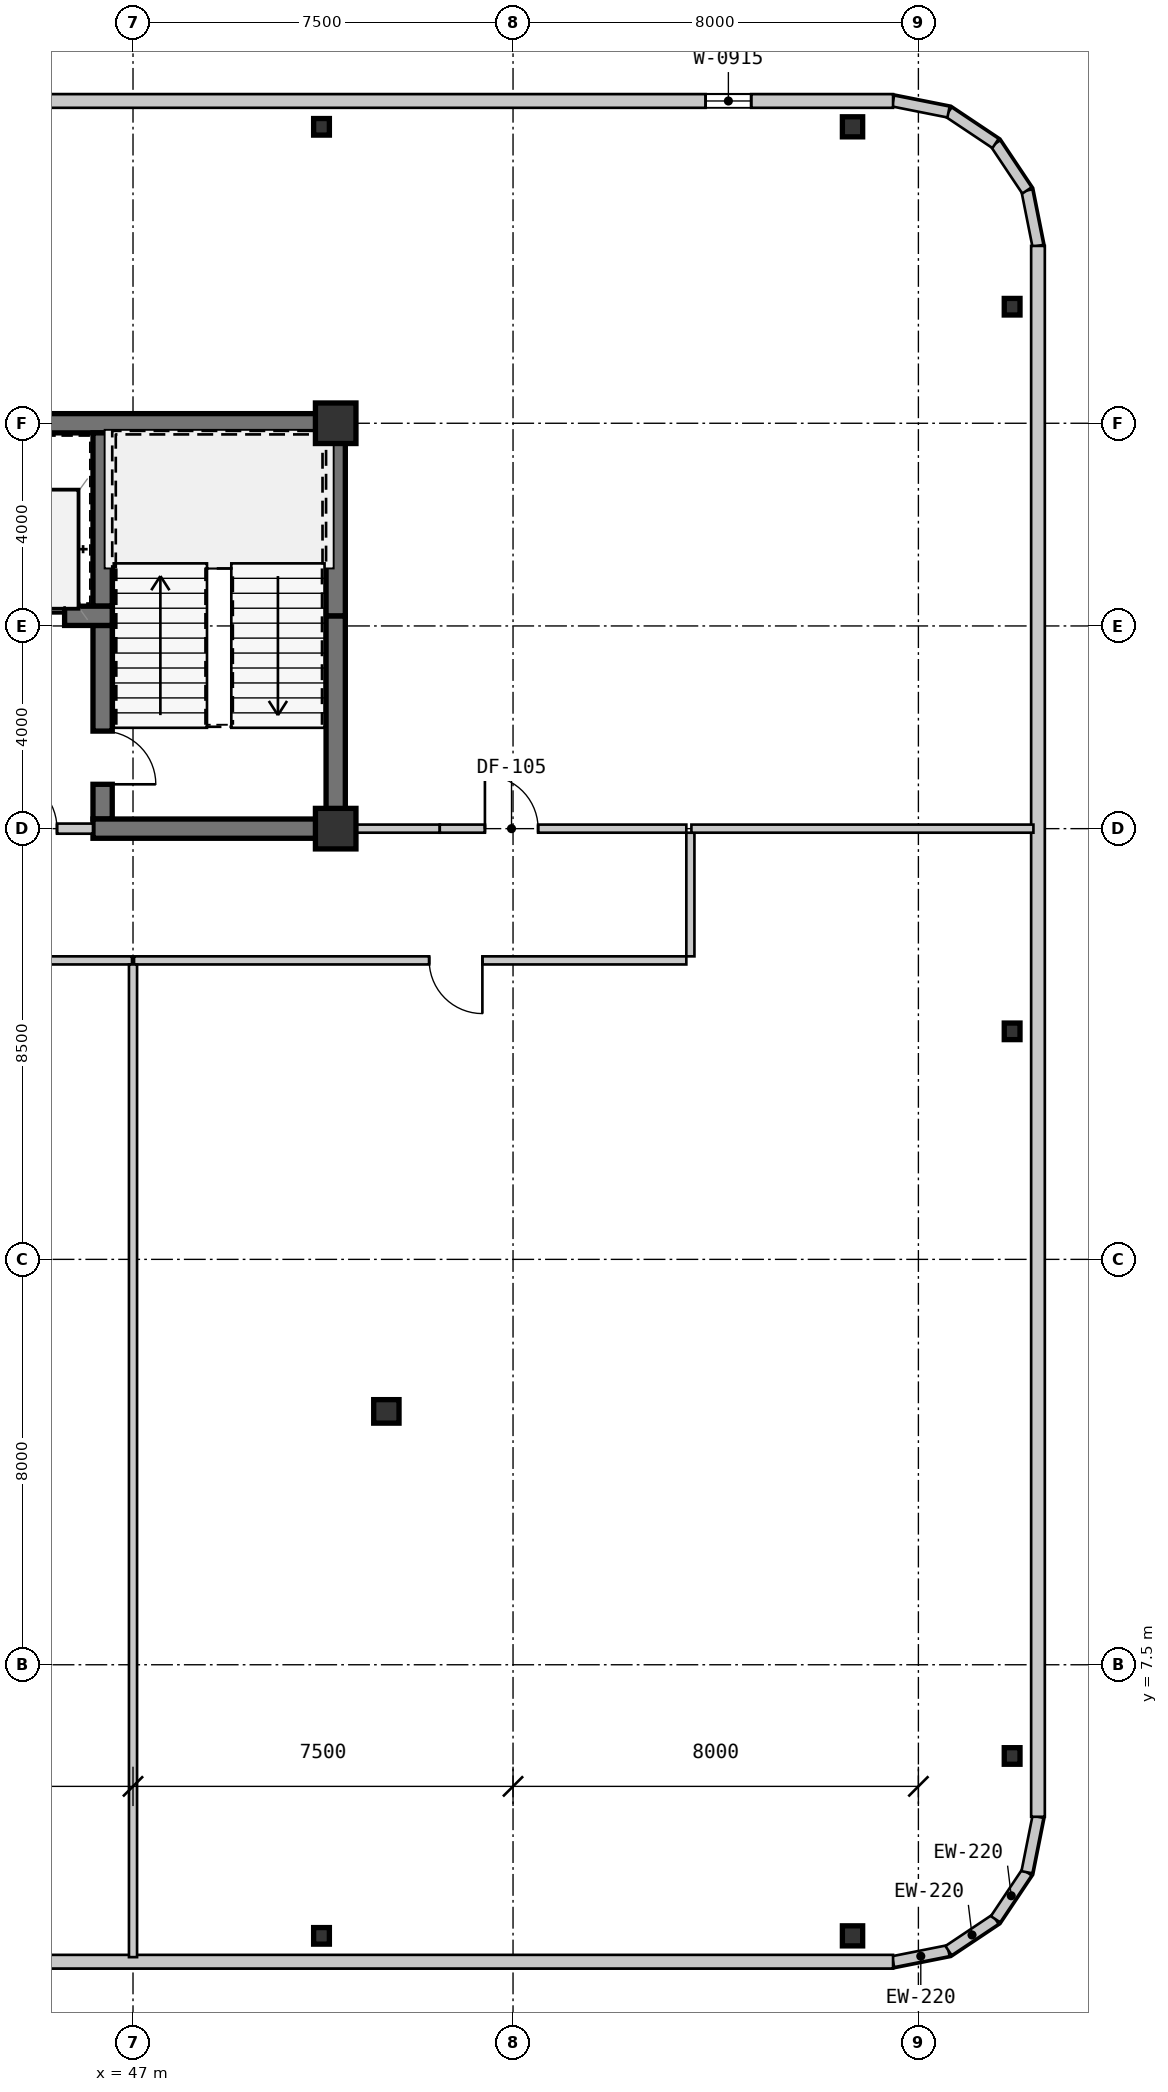
"""IFC4 building model, lengths in metres.
Left out: names, types, materials, properties, quantities, classifications, styles, units other than length and angle.
Written with IfcOpenShell. Run it as: python <this file> out.ifc"""

import sys

from ifc_helpers import new_model, si_unit, direction, frame, frame_2d, origin, origin_2d, place, context, subcontext, project, spatial, rectangle, i_section, extrude, source, transform, mapped, element, fill, save


model = new_model("IFC4")
c1 = context("Model", 3, precision=1e-05, world=origin(), true_north=direction((0.0, 1.0)))
c2 = subcontext(c1, "Body", "Model", "MODEL_VIEW")
j1 = project(units=[si_unit("LENGTHUNIT", "METRE"), si_unit("PLANEANGLEUNIT", "RADIAN")], contexts=[c1])
p1 = place(None, origin())
s1 = spatial("IfcSite", under=j1, at=p1, CompositionType="ELEMENT")
p2 = place(p1, origin())
s2 = spatial("IfcBuilding", under=s1, at=p2, CompositionType="ELEMENT")
p3 = place(p2, frame((0.0, 0.0, 60.9)))
s3 = spatial("IfcBuildingStorey", under=s2, at=p3, CompositionType="ELEMENT", Elevation=60.9)
m1 = source(origin(), c2, "Body", "SweptSolid", [
    extrude(rectangle(XDim=0.8, YDim=0.8, at=origin_2d()), origin(), (0.0, 0.0, 1.0), 4.2),
])
for number, where, z_axis, x_axis in (
    (1, (51.0, 24.0, 0.0), (0.0, 0.0, 1.0), (1.0, 0.0, 0.0)),
    (2, (51.0, 32.0, 0.0), (0.0, 0.0, 1.0), (1.0, 0.0, 0.0)),
):
    element("IfcColumn", number, at=place(p3, frame(where, z_axis=z_axis, x_axis=x_axis)), inside=s3, PredefinedType="COLUMN", context=c2, shape_type="MappedRepresentation", body=[
        mapped(m1, transform((0.0, 0.0, 0.0), scale=1.0)),
    ])
m2 = source(origin(), c2, "Body", "SweptSolid", [
    extrude(i_section(OverallWidth=0.5, OverallDepth=0.464, WebThickness=0.022, FlangeThickness=0.034, at=origin_2d()), origin(), (0.0, 0.0, 1.0), 4.2),
])
p4 = place(p3, frame((52.0, 12.5, 0.0), z_axis=(0.0, 0.0, 1.0), x_axis=(1.0, 0.0, 0.0)))
e3 = element("IfcColumn", 3, at=p4, inside=s3, PredefinedType="COLUMN", context=c2, shape_type="MappedRepresentation", body=[
    mapped(m2, transform((0.0, 0.0, 0.0), scale=1.0)),
])
m3 = source(origin(), c2, "Body", "SweptSolid", [
    extrude(i_section(OverallWidth=0.311, OverallDepth=0.327, WebThickness=0.016, FlangeThickness=0.025, at=origin_2d()), origin(), (0.0, 0.0, 1.0), 4.2),
])
p5 = place(p3, frame((50.72, 2.15, 0.0), z_axis=(0.0, 0.0, 1.0), x_axis=(1.0, 0.0, 0.0)))
e4 = element("IfcColumn", 4, at=p5, inside=s3, PredefinedType="COLUMN", context=c2, shape_type="MappedRepresentation", body=[
    mapped(m3, transform((0.0, 0.0, 0.0), scale=1.0)),
])
m4 = source(origin(), c2, "Body", "SweptSolid", [
    extrude(i_section(OverallWidth=0.4, OverallDepth=0.396, WebThickness=0.022, FlangeThickness=0.034, at=origin_2d()), origin(), (0.0, 0.0, 1.0), 4.2),
])
p6 = place(p3, frame((61.2, 2.15, 0.0), z_axis=(0.0, 0.0, 1.0), x_axis=(1.0, 0.0, 0.0)))
e5 = element("IfcColumn", 5, at=p6, inside=s3, PredefinedType="COLUMN", context=c2, shape_type="MappedRepresentation", body=[
    mapped(m4, transform((0.0, 0.0, 0.0), scale=1.0)),
])
p7 = place(p3, frame((50.72, 37.85, 0.0), z_axis=(0.0, 0.0, 1.0), x_axis=(1.0, 0.0, 0.0)))
e6 = element("IfcColumn", 6, at=p7, inside=s3, PredefinedType="COLUMN", context=c2, shape_type="MappedRepresentation", body=[
    mapped(m3, transform((0.0, 0.0, 0.0), scale=1.0)),
])
p8 = place(p3, frame((61.2, 37.85, 0.0), z_axis=(0.0, 0.0, 1.0), x_axis=(1.0, 0.0, 0.0)))
e7 = element("IfcColumn", 7, at=p8, inside=s3, PredefinedType="COLUMN", context=c2, shape_type="MappedRepresentation", body=[
    mapped(m4, transform((0.0, 0.0, 0.0), scale=1.0)),
])
for number, where, z_axis, x_axis in (
    (8, (64.35, 5.7, 0.0), (0.0, 0.0, 1.0), (1.0, 0.0, 0.0)),
    (9, (64.35, 20.0, 0.0), (0.0, 0.0, 1.0), (1.0, 0.0, 0.0)),
    (10, (64.35, 34.3, 0.0), (0.0, 0.0, 1.0), (1.0, 0.0, 0.0)),
):
    element("IfcColumn", number, at=place(p3, frame(where, z_axis=z_axis, x_axis=x_axis)), inside=s3, PredefinedType="COLUMN", context=c2, shape_type="MappedRepresentation", body=[
        mapped(m3, transform((0.0, 0.0, 0.0), scale=1.0)),
    ])
m5 = source(origin(), c2, "Body", "SweptSolid", [
    extrude(rectangle(XDim=1.116, YDim=0.22, at=frame_2d((0.558, 0.0))), origin(), (0.0, 0.0, 1.0), 3.78),
])
for number, where, z_axis, x_axis in (
    (11, (62.0, 1.64, 0.0), (0.0, 0.0, 1.0), (0.981, 0.195, 0.0)),
    (12, (63.094, 1.858, 0.0), (0.0, 0.0, 1.0), (0.831, 0.556, 0.0)),
    (13, (64.022, 2.478, 0.0), (0.0, 0.0, 1.0), (0.556, 0.831, 0.0)),
    (14, (64.642, 3.406, 0.0), (0.0, 0.0, 1.0), (0.195, 0.981, 0.0)),
    (15, (64.86, 35.5, 0.0), (0.0, 0.0, 1.0), (-0.195, 0.981, 0.0)),
    (16, (64.642, 36.594, 0.0), (0.0, 0.0, 1.0), (-0.556, 0.831, 0.0)),
    (17, (64.022, 37.522, 0.0), (0.0, 0.0, 1.0), (-0.831, 0.556, 0.0)),
    (18, (63.094, 38.142, 0.0), (0.0, 0.0, 1.0), (-0.981, 0.195, 0.0)),
):
    element("IfcWall", number, at=place(p3, frame(where, z_axis=z_axis, x_axis=x_axis)), inside=s3, PredefinedType="SOLIDWALL", context=c2, shape_type="MappedRepresentation", body=[
        mapped(m5, transform((0.0, 0.0, 0.0), scale=1.0)),
    ])
m6 = source(origin(), c2, "Body", "SweptSolid", [
    extrude(rectangle(XDim=32.714, YDim=0.27, at=frame_2d((16.357, 0.0))), origin(), (0.0, 0.0, 1.0), 3.78),
])
p9 = place(p3, frame((29.286, 1.64, 0.0), z_axis=(0.0, 0.0, 1.0), x_axis=(1.0, 0.0, 0.0)))
e19 = element("IfcWall", 19, at=p9, inside=s3, PredefinedType="SOLIDWALL", context=c2, shape_type="MappedRepresentation", body=[
    mapped(m6, transform((0.0, 0.0, 0.0), scale=1.0)),
])
m7 = source(origin(), c2, "Body", "SweptSolid", [
    extrude(rectangle(XDim=54.0, YDim=0.27, at=frame_2d((27.0, 0.0))), origin(), (0.0, 0.0, 1.0), 3.78),
])
p10 = place(p3, frame((62.0, 38.36, 0.0), z_axis=(0.0, 0.0, 1.0), x_axis=(-1.0, 0.0, 0.0)))
e20 = element("IfcWall", 20, at=p10, inside=s3, PredefinedType="SOLIDWALL", context=c2, shape_type="MappedRepresentation", body=[
    mapped(m7, transform((0.0, 0.0, 0.0), scale=1.0)),
])
m8 = source(origin(), c2, "Body", "SweptSolid", [
    extrude(rectangle(XDim=0.9, YDim=1.5, at=frame_2d((0.45, 0.75))), frame((0.0, 0.145, 0.0), z_axis=(0.0, -1.0, 0.0), x_axis=(1.0, 0.0, 0.0)), (0.0, 0.0, 1.0), 0.29),
])
p11 = place(p10, frame((2.8, 0.0, 0.7)))
e21 = element("IfcOpeningElement", 21, at=p11, cuts=e20, PredefinedType="OPENING", context=c2, shape_type="MappedRepresentation", body=[
    mapped(m8, transform((0.0, 0.0, 0.0), scale=1.0)),
])
p12 = place(p10, frame((50.3, 0.0, 1.5)))
e22 = element("IfcOpeningElement", 22, at=p12, cuts=e20, PredefinedType="OPENING", context=c2, shape_type="MappedRepresentation", body=[
    mapped(m8, transform((0.0, 0.0, 0.0), scale=1.0)),
])
m9 = source(origin(), c2, "Body", "SweptSolid", [
    extrude(rectangle(XDim=31.0, YDim=0.27, at=frame_2d((15.5, 0.0))), origin(), (0.0, 0.0, 1.0), 3.78),
])
p13 = place(p3, frame((64.86, 4.5, 0.0), z_axis=(0.0, 0.0, 1.0), x_axis=(0.0, 1.0, 0.0)))
e23 = element("IfcWall", 23, at=p13, inside=s3, PredefinedType="SOLIDWALL", context=c2, shape_type="MappedRepresentation", body=[
    mapped(m9, transform((0.0, 0.0, 0.0), scale=1.0)),
])
m10 = source(origin(), c2, "Body", "SweptSolid", [
    extrude(rectangle(XDim=11.99, YDim=0.38, at=frame_2d((5.995, 0.0))), origin(), (0.0, 0.0, 1.0), 3.78),
])
p14 = place(p3, frame((39.2, 32.0, 0.0), z_axis=(0.0, 0.0, 1.0), x_axis=(1.0, 0.0, 0.0)))
e24 = element("IfcWall", 24, at=p14, inside=s3, PredefinedType="SHEAR", context=c2, shape_type="MappedRepresentation", body=[
    mapped(m10, transform((0.0, 0.0, 0.0), scale=1.0)),
])
m11 = source(origin(), c2, "Body", "SweptSolid", [
    extrude(rectangle(XDim=4.01, YDim=0.38, at=frame_2d((2.005, 0.0))), origin(), (0.0, 0.0, 1.0), 3.78),
])
p15 = place(p3, frame((51.0, 24.19, 0.0), z_axis=(0.0, 0.0, 1.0), x_axis=(0.0, 1.0, 0.0)))
e25 = element("IfcWall", 25, at=p15, inside=s3, PredefinedType="SHEAR", context=c2, shape_type="MappedRepresentation", body=[
    mapped(m11, transform((0.0, 0.0, 0.0), scale=1.0)),
])
m12 = source(origin(), c2, "Body", "SweptSolid", [
    extrude(rectangle(XDim=3.61, YDim=0.38, at=frame_2d((1.805, 0.0))), origin(), (0.0, 0.0, 1.0), 3.78),
])
p16 = place(p3, frame((51.0, 28.2, 0.0), z_axis=(0.0, 0.0, 1.0), x_axis=(0.0, 1.0, 0.0)))
e26 = element("IfcWall", 26, at=p16, inside=s3, PredefinedType="SHEAR", context=c2, shape_type="MappedRepresentation", body=[
    mapped(m12, transform((0.0, 0.0, 0.0), scale=1.0)),
])
m13 = source(origin(), c2, "Body", "SweptSolid", [
    extrude(rectangle(XDim=3.42, YDim=0.38, at=frame_2d((1.71, 0.0))), origin(), (0.0, 0.0, 1.0), 3.78),
])
p17 = place(p3, frame((46.4, 31.81, 0.0), z_axis=(0.0, 0.0, 1.0), x_axis=(0.0, -1.0, 0.0)))
e27 = element("IfcWall", 27, at=p17, inside=s3, PredefinedType="SHEAR", context=c2, shape_type="MappedRepresentation", body=[
    mapped(m13, transform((0.0, 0.0, 0.0), scale=1.0)),
])
m14 = source(origin(), c2, "Body", "SweptSolid", [
    extrude(rectangle(XDim=3.82, YDim=0.38, at=frame_2d((1.91, 0.0))), origin(), (0.0, 0.0, 1.0), 3.78),
])
p18 = place(p3, frame((46.4, 28.01, 0.0), z_axis=(0.0, 0.0, 1.0), x_axis=(0.0, -1.0, 0.0)))
e28 = element("IfcWall", 28, at=p18, inside=s3, PredefinedType="SHEAR", context=c2, shape_type="MappedRepresentation", body=[
    mapped(m14, transform((0.0, 0.0, 0.0), scale=1.0)),
])
m15 = source(origin(), c2, "Body", "SweptSolid", [
    extrude(rectangle(XDim=1.05, YDim=2.1, at=frame_2d((0.525, 1.05))), frame((0.0, 0.2, 0.0), z_axis=(0.0, -1.0, 0.0), x_axis=(1.0, 0.0, 0.0)), (0.0, 0.0, 1.0), 0.4),
])
p19 = place(p18, frame((2.085, 0.0, 0.0)))
e29 = element("IfcOpeningElement", 29, at=p19, cuts=e28, PredefinedType="OPENING", context=c2, shape_type="MappedRepresentation", body=[
    mapped(m15, transform((0.0, 0.0, 0.0), scale=1.0)),
])
m16 = source(origin(), c2, "Body", "SweptSolid", [
    extrude(rectangle(XDim=4.98, YDim=0.38, at=frame_2d((2.49, 0.0))), origin(), (0.0, 0.0, 1.0), 3.78),
])
p20 = place(p3, frame((46.21, 24.0, 0.0), z_axis=(0.0, 0.0, 1.0), x_axis=(1.0, 0.0, 0.0)))
e30 = element("IfcWall", 30, at=p20, inside=s3, PredefinedType="SHEAR", context=c2, shape_type="MappedRepresentation", body=[
    mapped(m16, transform((0.0, 0.0, 0.0), scale=1.0)),
])
m17 = source(origin(), c2, "Body", "SweptSolid", [
    extrude(rectangle(XDim=2.98, YDim=0.38, at=frame_2d((1.49, 0.0))), origin(), (0.0, 0.0, 1.0), 3.78),
])
p21 = place(p3, frame((43.61, 28.2, 0.0), z_axis=(0.0, 0.0, 1.0), x_axis=(1.0, 0.0, 0.0)))
e31 = element("IfcWall", 31, at=p21, inside=s3, PredefinedType="SHEAR", context=c2, shape_type="MappedRepresentation", body=[
    mapped(m17, transform((0.0, 0.0, 0.0), scale=1.0)),
])
m18 = source(origin(), c2, "Body", "SweptSolid", [
    extrude(rectangle(XDim=1.1, YDim=2.15, at=frame_2d((0.55, 1.075))), frame((0.0, 0.2, 0.0), z_axis=(0.0, -1.0, 0.0), x_axis=(1.0, 0.0, 0.0)), (0.0, 0.0, 1.0), 0.4),
])
p22 = place(p21, frame((0.94, 0.0, 0.0)))
e32 = element("IfcOpeningElement", 32, at=p22, cuts=e31, PredefinedType="OPENING", context=c2, shape_type="MappedRepresentation", body=[
    mapped(m18, transform((0.0, 0.0, 0.0), scale=1.0)),
])
m19 = source(origin(), c2, "Body", "SweptSolid", [
    extrude(rectangle(XDim=2.66, YDim=0.2, at=frame_2d((1.33, 0.0))), origin(), (0.0, 0.0, 1.0), 3.247),
])
p23 = place(p3, frame((43.55, 24.0, 0.0), z_axis=(0.0, 0.0, 1.0), x_axis=(1.0, 0.0, 0.0)))
e33 = element("IfcWall", 33, at=p23, inside=s3, PredefinedType="SOLIDWALL", context=c2, shape_type="MappedRepresentation", body=[
    mapped(m19, transform((0.0, 0.0, 0.0), scale=1.0)),
])
m20 = source(origin(), c2, "Body", "SweptSolid", [
    extrude(rectangle(XDim=1.05, YDim=2.1, at=frame_2d((0.525, 1.05))), frame((0.0, 0.11, 0.0), z_axis=(0.0, -1.0, 0.0), x_axis=(1.0, 0.0, 0.0)), (0.0, 0.0, 1.0), 0.22),
])
p24 = place(p23, frame((0.9, 0.0, 0.0)))
e34 = element("IfcOpeningElement", 34, at=p24, cuts=e33, PredefinedType="OPENING", context=c2, shape_type="MappedRepresentation", body=[
    mapped(m20, transform((0.0, 0.0, 0.0), scale=1.0)),
])
m21 = source(origin(), c2, "Body", "SweptSolid", [
    extrude(rectangle(XDim=1.865, YDim=0.16, at=frame_2d((0.932, 0.0))), origin(), (0.0, 0.0, 1.0), 2.28),
])
p25 = place(p3, frame((51.19, 24.0, 0.0), z_axis=(0.0, 0.0, 1.0), x_axis=(1.0, 0.0, 0.0)))
e35 = element("IfcWall", 35, at=p25, inside=s3, PredefinedType="PARTITIONING", context=c2, shape_type="MappedRepresentation", body=[
    mapped(m21, transform((0.0, 0.0, 0.0), scale=1.0)),
])
m22 = source(origin(), c2, "Body", "SweptSolid", [
    extrude(rectangle(XDim=4.865, YDim=0.16, at=frame_2d((2.433, 0.0))), origin(), (0.0, 0.0, 1.0), 3.78),
])
p26 = place(p3, frame((53.054, 24.0, 0.0), z_axis=(0.0, 0.0, 1.0), x_axis=(1.0, 0.0, 0.0)))
e36 = element("IfcWall", 36, at=p26, inside=s3, PredefinedType="PARTITIONING", context=c2, shape_type="MappedRepresentation", body=[
    mapped(m22, transform((0.0, 0.0, 0.0), scale=1.0)),
])
m23 = source(origin(), c2, "Body", "SweptSolid", [
    extrude(rectangle(XDim=1.05, YDim=2.1, at=frame_2d((0.525, 1.05))), frame((0.0, 0.09, 0.0), z_axis=(0.0, -1.0, 0.0), x_axis=(1.0, 0.0, 0.0)), (0.0, 0.0, 1.0), 0.18),
])
p27 = place(p26, frame((0.891, 0.0, 0.0)))
e37 = element("IfcOpeningElement", 37, at=p27, cuts=e36, PredefinedType="OPENING", context=c2, shape_type="MappedRepresentation", body=[
    mapped(m23, transform((0.0, 0.0, 0.0), scale=1.0)),
])
m24 = source(origin(), c2, "Body", "SweptSolid", [
    extrude(rectangle(XDim=11.959, YDim=0.16, at=frame_2d((5.98, 0.0))), origin(), (0.0, 0.0, 1.0), 3.78),
])
p28 = place(p3, frame((46.98, 21.4, 0.0), z_axis=(0.0, 0.0, 1.0), x_axis=(-1.0, 0.0, 0.0)))
e38 = element("IfcWall", 38, at=p28, inside=s3, PredefinedType="PARTITIONING", context=c2, shape_type="MappedRepresentation", body=[
    mapped(m24, transform((0.0, 0.0, 0.0), scale=1.0)),
])
p29 = place(p28, frame((4.905, 0.0, 0.0)))
e39 = element("IfcOpeningElement", 39, at=p29, cuts=e38, PredefinedType="OPENING", context=c2, shape_type="MappedRepresentation", body=[
    mapped(m23, transform((0.0, 0.0, 0.0), scale=1.0)),
])
m25 = source(origin(), c2, "Body", "SweptSolid", [
    extrude(rectangle(XDim=10.9, YDim=0.16, at=frame_2d((5.45, 0.0))), origin(), (0.0, 0.0, 1.0), 3.78),
])
p30 = place(p3, frame((57.92, 21.4, 0.0), z_axis=(0.0, 0.0, 1.0), x_axis=(-1.0, 0.0, 0.0)))
e40 = element("IfcWall", 40, at=p30, inside=s3, PredefinedType="PARTITIONING", context=c2, shape_type="MappedRepresentation", body=[
    mapped(m25, transform((0.0, 0.0, 0.0), scale=1.0)),
])
p31 = place(p30, frame((4.025, 0.0, 0.0)))
e41 = element("IfcOpeningElement", 41, at=p31, cuts=e40, PredefinedType="OPENING", context=c2, shape_type="MappedRepresentation", body=[
    mapped(m23, transform((0.0, 0.0, 0.0), scale=1.0)),
])
m26 = source(origin(), c2, "Body", "SweptSolid", [
    extrude(rectangle(XDim=2.44, YDim=0.16, at=frame_2d((1.22, 0.0))), origin(), (0.0, 0.0, 1.0), 3.78),
])
p32 = place(p3, frame((58.0, 23.92, 0.0), z_axis=(0.0, 0.0, 1.0), x_axis=(0.0, -1.0, 0.0)))
e42 = element("IfcWall", 42, at=p32, inside=s3, PredefinedType="PARTITIONING", context=c2, shape_type="MappedRepresentation", body=[
    mapped(m26, transform((0.0, 0.0, 0.0), scale=1.0)),
])
m27 = source(origin(), c2, "Body", "SweptSolid", [
    extrude(rectangle(XDim=6.75, YDim=0.16, at=frame_2d((3.375, 0.0))), origin(), (0.0, 0.0, 1.0), 3.78),
])
p33 = place(p3, frame((64.77, 24.0, 0.0), z_axis=(0.0, 0.0, 1.0), x_axis=(-1.0, 0.0, 0.0)))
e43 = element("IfcWall", 43, at=p33, inside=s3, PredefinedType="PARTITIONING", context=c2, shape_type="MappedRepresentation", body=[
    mapped(m27, transform((0.0, 0.0, 0.0), scale=1.0)),
])
m28 = source(origin(), c2, "Body", "SweptSolid", [
    extrude(rectangle(XDim=19.59, YDim=0.16, at=frame_2d((9.795, 0.0))), origin(), (0.0, 0.0, 1.0), 3.78),
])
p34 = place(p3, frame((47.0, 21.32, 0.0), z_axis=(0.0, 0.0, 1.0), x_axis=(0.0, -1.0, 0.0)))
e44 = element("IfcWall", 44, at=p34, inside=s3, PredefinedType="PARTITIONING", context=c2, shape_type="MappedRepresentation", body=[
    mapped(m28, transform((0.0, 0.0, 0.0), scale=1.0)),
])
m29 = source(origin(), c2, "Body", "SweptSolid", [
    extrude(rectangle(XDim=0.9, YDim=1.5, at=frame_2d((0.45, 0.75))), frame((0.0, 0.03, 0.0), z_axis=(0.0, -1.0, 0.0), x_axis=(1.0, 0.0, 0.0)), (0.0, 0.0, 1.0), 0.06),
])
p35 = place(p11, origin())
e45 = element("IfcWindow", 45, at=p35, inside=s3, PartitioningType="SINGLE_PANEL", PredefinedType="WINDOW", context=c2, shape_type="MappedRepresentation", body=[
    mapped(m29, transform((0.0, 0.0, 0.0), scale=1.0)),
])
fill(e21, e45)
m30 = source(origin(), c2, "Body", "SweptSolid", [
    extrude(rectangle(XDim=1.05, YDim=2.1, at=frame_2d((0.525, 1.05))), frame((0.0, 0.025, 0.0), z_axis=(0.0, -1.0, 0.0), x_axis=(1.0, 0.0, 0.0)), (0.0, 0.0, 1.0), 0.05),
])
p36 = place(p19, origin())
e46 = element("IfcDoor", 46, at=p36, inside=s3, OperationType="SINGLE_SWING_RIGHT", PredefinedType="DOOR", context=c2, shape_type="MappedRepresentation", body=[
    mapped(m30, transform((0.0, 0.0, 0.0), scale=1.0)),
])
fill(e29, e46)
m31 = source(origin(), c2, "Body", "SweptSolid", [
    extrude(rectangle(XDim=1.1, YDim=2.15, at=frame_2d((0.55, 1.075))), frame((0.0, 0.025, 0.0), z_axis=(0.0, -1.0, 0.0), x_axis=(1.0, 0.0, 0.0)), (0.0, 0.0, 1.0), 0.05),
])
p37 = place(p22, origin())
e47 = element("IfcDoor", 47, at=p37, inside=s3, OperationType="SLIDING_TO_LEFT", PredefinedType="DOOR", context=c2, shape_type="MappedRepresentation", body=[
    mapped(m31, transform((0.0, 0.0, 0.0), scale=1.0)),
])
fill(e32, e47)
p38 = place(p24, origin())
e48 = element("IfcDoor", 48, at=p38, inside=s3, OperationType="SINGLE_SWING_LEFT", PredefinedType="DOOR", context=c2, shape_type="MappedRepresentation", body=[
    mapped(m30, transform((0.0, 0.0, 0.0), scale=1.0)),
])
fill(e34, e48)
p39 = place(p27, origin())
e49 = element("IfcDoor", 49, at=p39, inside=s3, OperationType="SINGLE_SWING_LEFT", PredefinedType="DOOR", context=c2, shape_type="MappedRepresentation", body=[
    mapped(m30, transform((0.0, 0.0, 0.0), scale=1.0)),
])
fill(e37, e49)
p40 = place(p31, origin())
e50 = element("IfcDoor", 50, at=p40, inside=s3, OperationType="SINGLE_SWING_LEFT", PredefinedType="DOOR", context=c2, shape_type="MappedRepresentation", body=[
    mapped(m30, transform((0.0, 0.0, 0.0), scale=1.0)),
])
fill(e41, e50)
save(model, sys.argv[1])
